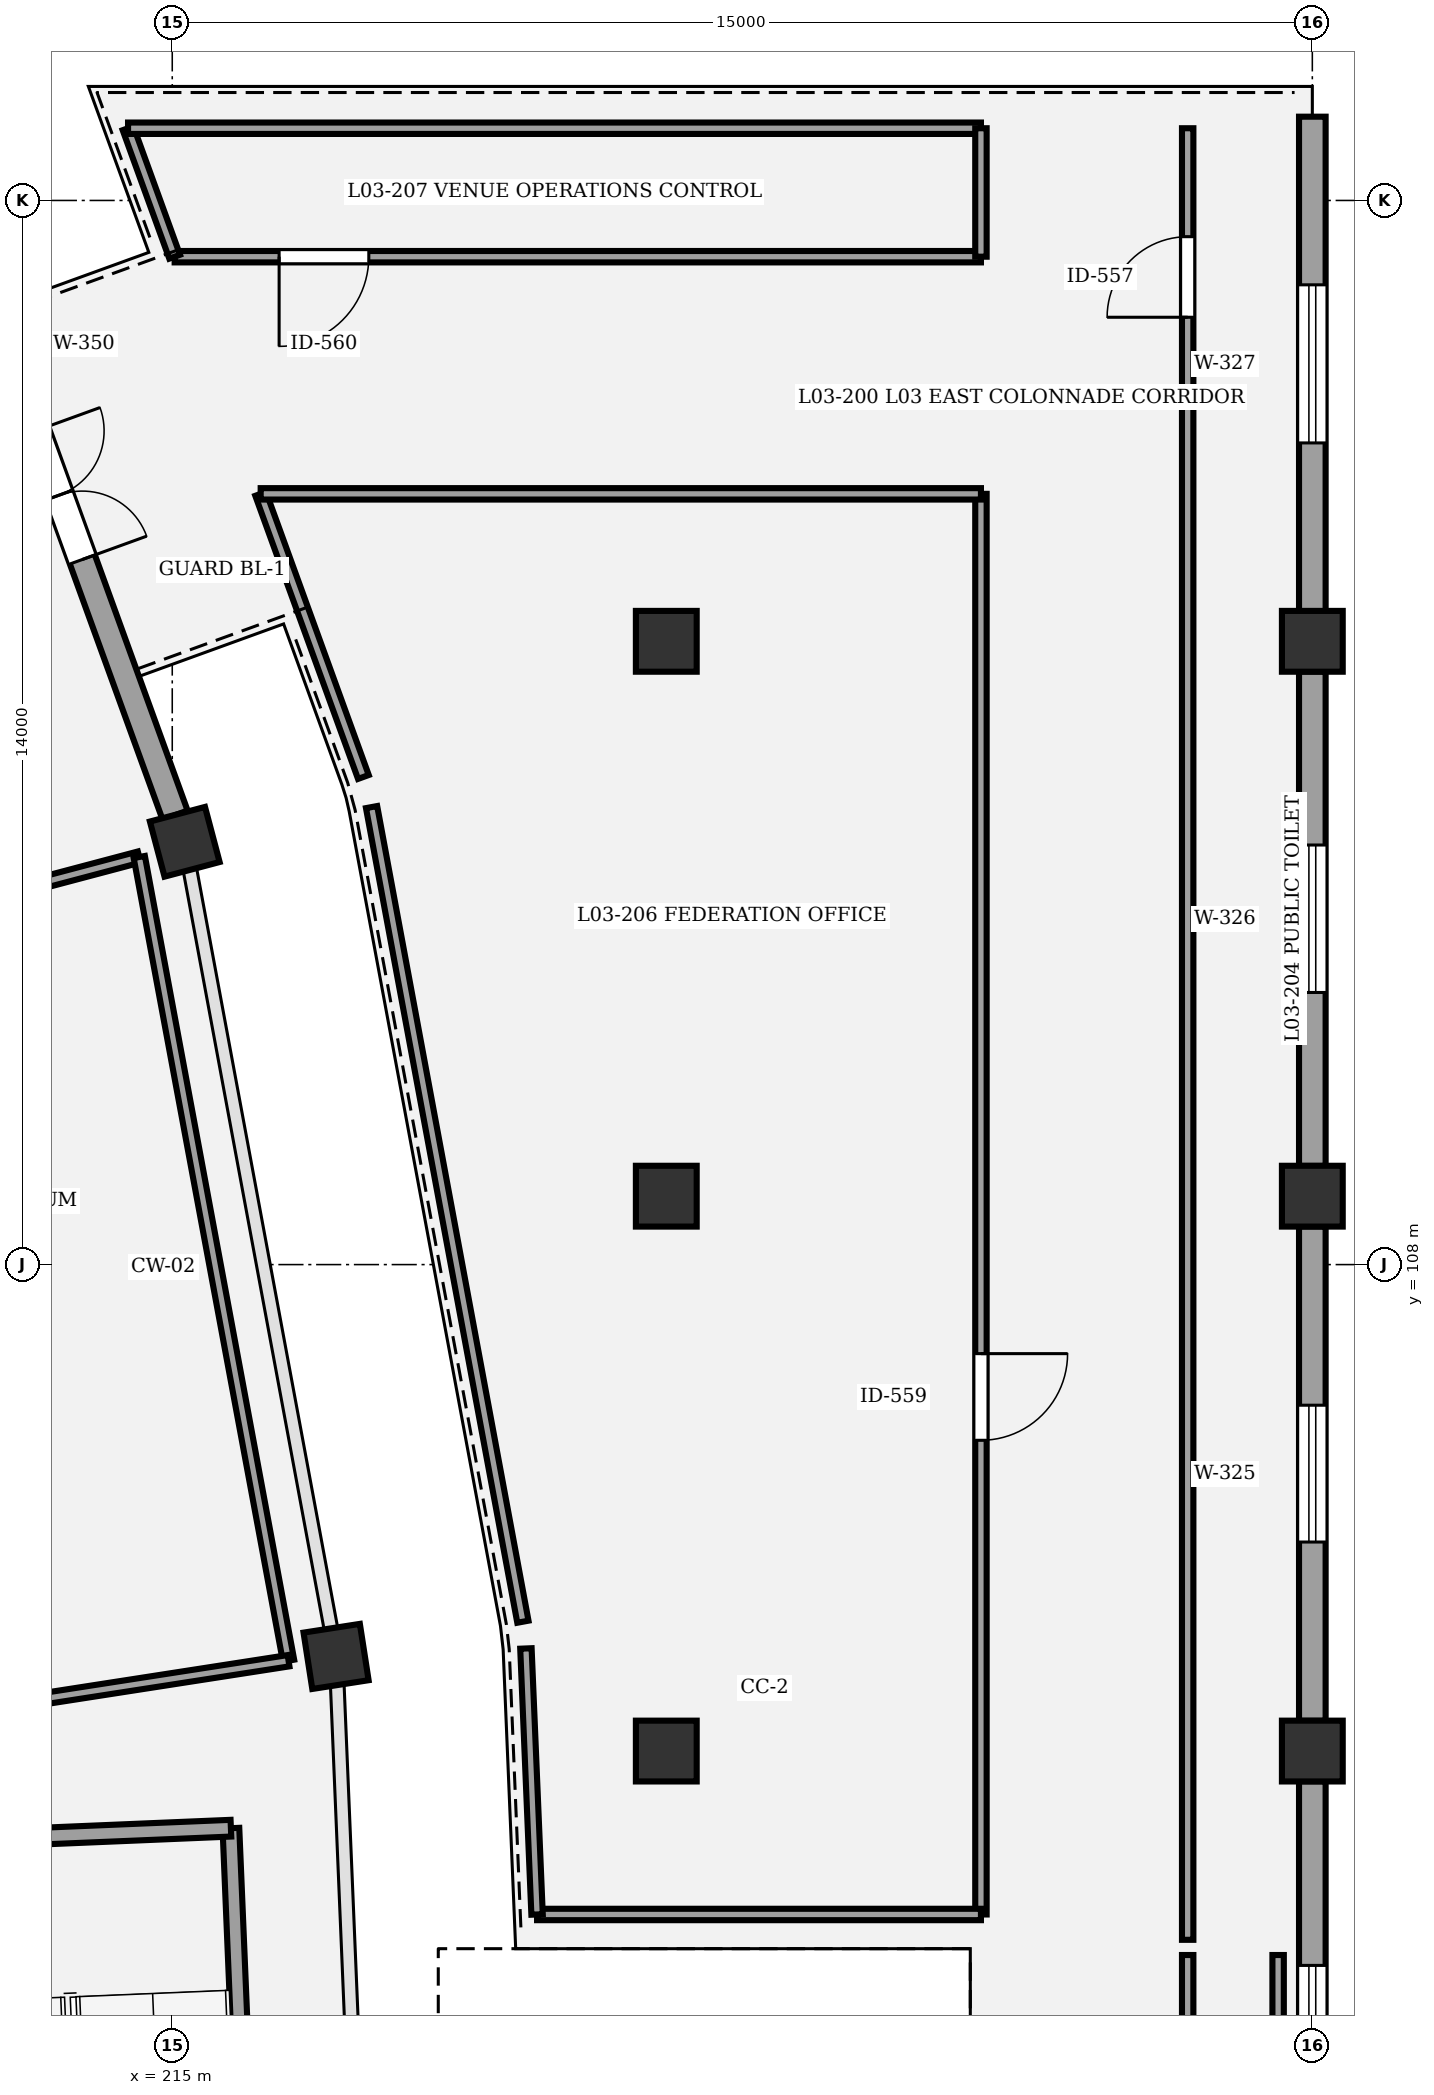
"""IFC4 building model, lengths in metres.
Left out: names, types, materials, properties, quantities, classifications, styles, units other than length and angle.
Written with IfcOpenShell. Run it as: python <this file> out.ifc"""

import sys

from ifc_helpers import new_model, si_unit, direction, frame, frame_2d, origin, origin_2d, place, context, subcontext, project, spatial, rectangle, circle, extrude, element, fill, save


model = new_model("IFC4")
c1 = context("Model", 3, precision=1e-05, world=origin(), true_north=direction((0.0, 1.0)))
c2 = subcontext(c1, "Body", "Model", "MODEL_VIEW")
j1 = project(units=[si_unit("LENGTHUNIT", "METRE"), si_unit("PLANEANGLEUNIT", "RADIAN")], contexts=[c1])
p1 = place(None, origin())
s1 = spatial("IfcSite", under=j1, at=p1, CompositionType="ELEMENT")
p2 = place(p1, origin())
s2 = spatial("IfcBuilding", under=s1, at=p2, CompositionType="ELEMENT")
p3 = place(p2, frame((0.0, 0.0, 14.7)))
s3 = spatial("IfcBuildingStorey", under=s2, at=p3, CompositionType="ELEMENT", Elevation=14.7)
for number, where, z_axis, x_axis in (
    (1, (217.156, 102.845, 0.0), (0.0, 0.0, 1.0), (0.988, 0.153, 0.0)),
    (2, (215.165, 113.562, 0.0), (0.0, 0.0, 1.0), (0.967, 0.256, 0.0)),
):
    element("IfcColumn", number, at=place(p3, frame(where, z_axis=z_axis, x_axis=x_axis)), inside=s3, PredefinedType="COLUMN", context=c2, shape_type="SweptSolid", body=[
        extrude(rectangle(XDim=0.75, YDim=0.75, at=origin_2d()), origin(), (0.0, 0.0, 1.0), 4.5),
    ])
for number, where, z_axis, x_axis in (
    (3, (221.5, 101.6, 0.0), (0.0, 0.0, 1.0), (1.0, 0.0, 0.0)),
    (4, (221.5, 108.9, 0.0), (0.0, 0.0, 1.0), (1.0, 0.0, 0.0)),
    (5, (221.5, 116.2, 0.0), (0.0, 0.0, 1.0), (1.0, 0.0, 0.0)),
    (6, (230.0, 101.6, 0.0), (0.0, 0.0, 1.0), (1.0, 0.0, 0.0)),
    (7, (230.0, 108.9, 0.0), (0.0, 0.0, 1.0), (1.0, 0.0, 0.0)),
    (8, (230.0, 116.2, 0.0), (0.0, 0.0, 1.0), (1.0, 0.0, 0.0)),
):
    element("IfcColumn", number, at=place(p3, frame(where, z_axis=z_axis, x_axis=x_axis)), inside=s3, PredefinedType="COLUMN", context=c2, shape_type="SweptSolid", body=[
        extrude(circle(Radius=0.4, at=origin_2d()), origin(), (0.0, 0.0, 1.0), 4.5),
    ])
p4 = place(p3, frame((211.983, 122.332, 0.0), z_axis=(0.0, 0.0, 1.0), x_axis=(0.341014063491, -0.94005819421, 0.0)))
e9 = element("IfcWall", 9, at=p4, inside=s3, PredefinedType="STANDARD", context=c2, shape_type="SweptSolid", body=[
    extrude(rectangle(XDim=8.956, YDim=0.35, at=frame_2d((4.478, 0.0))), origin(), (0.0, 0.0, 1.0), 3.42),
])
p5 = place(p4, frame((3.578, 0.0, 0.0)))
e10 = element("IfcOpeningElement", 10, at=p5, cuts=e9, PredefinedType="OPENING", context=c2, shape_type="SweptSolid", body=[
    extrude(rectangle(XDim=1.8, YDim=2.4, at=frame_2d((0.9, 1.2))), frame((0.0, 0.185, 0.0), z_axis=(0.0, -1.0, 0.0), x_axis=(1.0, 0.0, 0.0)), (0.0, 0.0, 1.0), 0.37),
])
p6 = place(p3, frame((230.0, 101.202, 0.0), z_axis=(0.0, 0.0, 1.0), x_axis=(0.0, -1.0, 0.0)))
e11 = element("IfcWall", 11, at=p6, inside=s3, PredefinedType="STANDARD", context=c2, shape_type="SweptSolid", body=[
    extrude(rectangle(XDim=6.504, YDim=0.35, at=frame_2d((3.252, 0.0))), origin(), (0.0, 0.0, 1.0), 3.26),
])
p7 = place(p6, frame((2.422, 0.0, 0.9)))
e12 = element("IfcOpeningElement", 12, at=p7, cuts=e11, PredefinedType="OPENING", context=c2, shape_type="SweptSolid", body=[
    extrude(rectangle(XDim=1.66, YDim=1.75, at=frame_2d((0.83, 0.875))), frame((0.0, 0.185, 0.0), z_axis=(0.0, -1.0, 0.0), x_axis=(1.0, 0.0, 0.0)), (0.0, 0.0, 1.0), 0.37),
])
p8 = place(p3, frame((230.0, 108.502, 0.0), z_axis=(0.0, 0.0, 1.0), x_axis=(0.0, -1.0, 0.0)))
e13 = element("IfcWall", 13, at=p8, inside=s3, PredefinedType="STANDARD", context=c2, shape_type="SweptSolid", body=[
    extrude(rectangle(XDim=6.504, YDim=0.35, at=frame_2d((3.252, 0.0))), origin(), (0.0, 0.0, 1.0), 3.26),
])
p9 = place(p8, frame((2.352, 0.0, 0.9)))
e14 = element("IfcOpeningElement", 14, at=p9, cuts=e13, PredefinedType="OPENING", context=c2, shape_type="SweptSolid", body=[
    extrude(rectangle(XDim=1.8, YDim=1.75, at=frame_2d((0.9, 0.875))), frame((0.0, 0.185, 0.0), z_axis=(0.0, -1.0, 0.0), x_axis=(1.0, 0.0, 0.0)), (0.0, 0.0, 1.0), 0.37),
])
p10 = place(p3, frame((230.0, 115.802, 0.0), z_axis=(0.0, 0.0, 1.0), x_axis=(0.0, -1.0, 0.0)))
e15 = element("IfcWall", 15, at=p10, inside=s3, PredefinedType="STANDARD", context=c2, shape_type="SweptSolid", body=[
    extrude(rectangle(XDim=6.504, YDim=0.35, at=frame_2d((3.252, 0.0))), origin(), (0.0, 0.0, 1.0), 3.26),
])
p11 = place(p10, frame((2.282, 0.0, 0.9)))
e16 = element("IfcOpeningElement", 16, at=p11, cuts=e15, PredefinedType="OPENING", context=c2, shape_type="SweptSolid", body=[
    extrude(rectangle(XDim=1.94, YDim=1.75, at=frame_2d((0.97, 0.875))), frame((0.0, 0.185, 0.0), z_axis=(0.0, -1.0, 0.0), x_axis=(1.0, 0.0, 0.0)), (0.0, 0.0, 1.0), 0.37),
])
p12 = place(p3, frame((230.0, 123.102, 0.0), z_axis=(0.0, 0.0, 1.0), x_axis=(0.0, -1.0, 0.0)))
e17 = element("IfcWall", 17, at=p12, inside=s3, PredefinedType="STANDARD", context=c2, shape_type="SweptSolid", body=[
    extrude(rectangle(XDim=6.504, YDim=0.35, at=frame_2d((3.252, 0.0))), origin(), (0.0, 0.0, 1.0), 3.26),
])
p13 = place(p12, frame((2.212, 0.0, 0.9)))
e18 = element("IfcOpeningElement", 18, at=p13, cuts=e17, PredefinedType="OPENING", context=c2, shape_type="SweptSolid", body=[
    extrude(rectangle(XDim=2.08, YDim=1.75, at=frame_2d((1.04, 0.875))), frame((0.0, 0.185, 0.0), z_axis=(0.0, -1.0, 0.0), x_axis=(1.0, 0.0, 0.0)), (0.0, 0.0, 1.0), 0.37),
])
p14 = place(p3, frame((215.772, 100.585, 0.0), z_axis=(0.0, 0.0, 1.0), x_axis=(0.041871977473, -0.999122984173, 0.0)))
e19 = element("IfcWall", 19, at=p14, inside=s3, PredefinedType="SHEAR", context=c2, shape_type="SweptSolid", body=[
    extrude(rectangle(XDim=11.02, YDim=0.22, at=frame_2d((5.51, 0.0))), origin(), (0.0, 0.0, 1.0), 4.25),
])
p15 = place(p3, frame((211.365, 100.4, 0.0), z_axis=(0.0, 0.0, 1.0), x_axis=(0.999121521721, 0.041906859039, 0.0)))
e20 = element("IfcWall", 20, at=p15, inside=s3, PredefinedType="SHEAR", context=c2, shape_type="SweptSolid", body=[
    extrude(rectangle(XDim=4.41, YDim=0.22, at=frame_2d((2.205, 0.0))), origin(), (0.0, 0.0, 1.0), 4.25),
])
p16 = place(p3, frame((228.36, 75.083, 0.0), z_axis=(0.0, 0.0, 1.0), x_axis=(0.0, 1.0, 0.0)))
e21 = element("IfcWall", 21, at=p16, inside=s3, PredefinedType="PARTITIONING", context=c2, shape_type="SweptSolid", body=[
    extrude(rectangle(XDim=23.833, YDim=0.15, at=frame_2d((11.917, 0.0))), origin(), (0.0, 0.0, 1.0), 3.25),
])
p17 = place(p16, frame((8.081, 0.0, 0.0)))
e22 = element("IfcOpeningElement", 22, at=p17, cuts=e21, PredefinedType="OPENING", context=c2, shape_type="SweptSolid", body=[
    extrude(rectangle(XDim=1.02, YDim=2.2, at=frame_2d((0.51, 1.1))), frame((0.0, 0.085, 0.0), z_axis=(0.0, -1.0, 0.0), x_axis=(1.0, 0.0, 0.0)), (0.0, 0.0, 1.0), 0.17),
])
p18 = place(p3, frame((228.36, 99.117, 0.0), z_axis=(0.0, 0.0, 1.0), x_axis=(0.0, 1.0, 0.0)))
e23 = element("IfcWall", 23, at=p18, inside=s3, PredefinedType="PARTITIONING", context=c2, shape_type="SweptSolid", body=[
    extrude(rectangle(XDim=23.833, YDim=0.15, at=frame_2d((11.917, 0.0))), origin(), (0.0, 0.0, 1.0), 3.25),
])
p19 = place(p18, frame((21.347, 0.0, 0.0)))
e24 = element("IfcOpeningElement", 24, at=p19, cuts=e23, PredefinedType="OPENING", context=c2, shape_type="SweptSolid", body=[
    extrude(rectangle(XDim=1.06, YDim=2.2, at=frame_2d((0.53, 1.1))), frame((0.0, 0.085, 0.0), z_axis=(0.0, -1.0, 0.0), x_axis=(1.0, 0.0, 0.0)), (0.0, 0.0, 1.0), 0.17),
])
p20 = place(p3, frame((225.64, 118.14, 0.0), z_axis=(0.0, 0.0, 1.0), x_axis=(0.0, -1.0, 0.0)))
e25 = element("IfcWall", 25, at=p20, inside=s3, PredefinedType="PARTITIONING", context=c2, shape_type="SweptSolid", body=[
    extrude(rectangle(XDim=18.69, YDim=0.15, at=frame_2d((9.345, 0.0))), origin(), (0.0, 0.0, 1.0), 3.25),
])
p21 = place(p20, frame((11.312, 0.0, 0.0)))
e26 = element("IfcOpeningElement", 26, at=p21, cuts=e25, PredefinedType="OPENING", context=c2, shape_type="SweptSolid", body=[
    extrude(rectangle(XDim=1.14, YDim=2.2, at=frame_2d((0.57, 1.1))), frame((0.0, 0.085, 0.0), z_axis=(0.0, -1.0, 0.0), x_axis=(1.0, 0.0, 0.0)), (0.0, 0.0, 1.0), 0.17),
])
p22 = place(p3, frame((225.64, 121.26, 0.0), z_axis=(0.0, 0.0, 1.0), x_axis=(-1.0, 0.0, 0.0)))
e27 = element("IfcWall", 27, at=p22, inside=s3, PredefinedType="PARTITIONING", context=c2, shape_type="SweptSolid", body=[
    extrude(rectangle(XDim=10.608, YDim=0.15, at=frame_2d((5.304, 0.0))), origin(), (0.0, 0.0, 1.0), 3.25),
])
p23 = place(p22, frame((8.054, 0.0, 0.0)))
e28 = element("IfcOpeningElement", 28, at=p23, cuts=e27, PredefinedType="OPENING", context=c2, shape_type="SweptSolid", body=[
    extrude(rectangle(XDim=1.18, YDim=2.2, at=frame_2d((0.59, 1.1))), frame((0.0, 0.085, 0.0), z_axis=(0.0, -1.0, 0.0), x_axis=(1.0, 0.0, 0.0)), (0.0, 0.0, 1.0), 0.17),
])
p24 = place(p3, frame((206.895, 111.328, 0.0), z_axis=(0.0, 0.0, 1.0), x_axis=(0.966593450181, 0.25631445934, 0.0)))
e29 = element("IfcWall", 29, at=p24, inside=s3, PredefinedType="PARTITIONING", context=c2, shape_type="SweptSolid", body=[
    extrude(rectangle(XDim=7.936, YDim=0.15, at=frame_2d((3.968, 0.0))), origin(), (0.0, 0.0, 1.0), 3.25),
])
p25 = place(p3, frame((214.566, 113.362, 0.0), z_axis=(0.0, 0.0, 1.0), x_axis=(0.182607868301, -0.983185824976, 0.0)))
e30 = element("IfcWall", 30, at=p25, inside=s3, PredefinedType="PARTITIONING", context=c2, shape_type="SweptSolid", body=[
    extrude(rectangle(XDim=10.755, YDim=0.15, at=frame_2d((5.377, 0.0))), origin(), (0.0, 0.0, 1.0), 3.25),
])
p26 = place(p3, frame((216.53, 102.789, 0.0), z_axis=(0.0, 0.0, 1.0), x_axis=(-0.988185582016, -0.153262048451, 0.0)))
e31 = element("IfcWall", 31, at=p26, inside=s3, PredefinedType="PARTITIONING", context=c2, shape_type="SweptSolid", body=[
    extrude(rectangle(XDim=7.917, YDim=0.15, at=frame_2d((3.958, 0.0))), origin(), (0.0, 0.0, 1.0), 3.25),
])
p27 = place(p3, frame((229.55, 98.917, 0.0), z_axis=(0.0, 0.0, 1.0), x_axis=(0.0, -1.0, 0.0)))
e32 = element("IfcWall", 32, at=p27, inside=s3, PredefinedType="PARTITIONING", context=c2, shape_type="SweptSolid", body=[
    extrude(rectangle(XDim=23.833, YDim=0.15, at=frame_2d((11.917, 0.0))), origin(), (0.0, 0.0, 1.0), 3.25),
])
p28 = place(p3, frame((219.613, 103.302, 0.0), z_axis=(0.0, 0.0, 1.0), x_axis=(-0.182620957058, 0.983183393901, 0.0)))
e33 = element("IfcWall", 33, at=p28, inside=s3, PredefinedType="PARTITIONING", context=c2, shape_type="SweptSolid", body=[
    extrude(rectangle(XDim=10.901, YDim=0.15, at=frame_2d((5.45, 0.0))), origin(), (0.0, 0.0, 1.0), 3.25),
])
p29 = place(p3, frame((217.515, 114.415, 0.0), z_axis=(0.0, 0.0, 1.0), x_axis=(-0.341035525383, 0.94005040845, 0.0)))
e34 = element("IfcWall", 34, at=p29, inside=s3, PredefinedType="PARTITIONING", context=c2, shape_type="SweptSolid", body=[
    extrude(rectangle(XDim=3.962, YDim=0.15, at=frame_2d((1.981, 0.0))), origin(), (0.0, 0.0, 1.0), 3.25),
])
p30 = place(p3, frame((216.163, 118.14, 0.0), z_axis=(0.0, 0.0, 1.0), x_axis=(1.0, 0.0, 0.0)))
e35 = element("IfcWall", 35, at=p30, inside=s3, PredefinedType="PARTITIONING", context=c2, shape_type="SweptSolid", body=[
    extrude(rectangle(XDim=9.477, YDim=0.15, at=frame_2d((4.738, 0.0))), origin(), (0.0, 0.0, 1.0), 3.25),
])
p31 = place(p3, frame((225.64, 99.45, 0.0), z_axis=(0.0, 0.0, 1.0), x_axis=(-1.0, 0.0, 0.0)))
e36 = element("IfcWall", 36, at=p31, inside=s3, PredefinedType="PARTITIONING", context=c2, shape_type="SweptSolid", body=[
    extrude(rectangle(XDim=5.84, YDim=0.15, at=frame_2d((2.92, 0.0))), origin(), (0.0, 0.0, 1.0), 3.25),
])
p32 = place(p3, frame((219.8, 99.45, 0.0), z_axis=(0.0, 0.0, 1.0), x_axis=(-0.041888559174, 0.999122289117, 0.0)))
e37 = element("IfcWall", 37, at=p32, inside=s3, PredefinedType="PARTITIONING", context=c2, shape_type="SweptSolid", body=[
    extrude(rectangle(XDim=3.503, YDim=0.15, at=frame_2d((1.751, 0.0))), origin(), (0.0, 0.0, 1.0), 3.25),
])
p33 = place(p3, frame((215.031, 121.26, 0.0), z_axis=(0.0, 0.0, 1.0), x_axis=(-0.341012375502, 0.940058806541, 0.0)))
e38 = element("IfcWall", 38, at=p33, inside=s3, PredefinedType="PARTITIONING", context=c2, shape_type="SweptSolid", body=[
    extrude(rectangle(XDim=1.798, YDim=0.15, at=frame_2d((0.899, 0.0))), origin(), (0.0, 0.0, 1.0), 3.25),
])
p34 = place(p3, frame((214.418, 122.95, 0.0), z_axis=(0.0, 0.0, 1.0), x_axis=(1.0, 0.0, 0.0)))
e39 = element("IfcWall", 39, at=p34, inside=s3, PredefinedType="PARTITIONING", context=c2, shape_type="SweptSolid", body=[
    extrude(rectangle(XDim=11.221, YDim=0.15, at=frame_2d((5.611, 0.0))), origin(), (0.0, 0.0, 1.0), 3.25),
])
p35 = place(p3, frame((225.64, 122.95, 0.0), z_axis=(0.0, 0.0, 1.0), x_axis=(0.0, -1.0, 0.0)))
e40 = element("IfcWall", 40, at=p35, inside=s3, PredefinedType="PARTITIONING", context=c2, shape_type="SweptSolid", body=[
    extrude(rectangle(XDim=1.69, YDim=0.15, at=frame_2d((0.845, 0.0))), origin(), (0.0, 0.0, 1.0), 3.25),
])
p36 = place(p5, origin())
e41 = element("IfcDoor", 41, at=p36, inside=s3, OperationType="DOUBLE_DOOR_SINGLE_SWING", PredefinedType="DOOR", context=c2, shape_type="SweptSolid", body=[
    extrude(rectangle(XDim=1.8, YDim=2.4, at=frame_2d((0.9, 1.2))), frame((0.0, 0.025, 0.0), z_axis=(0.0, -1.0, 0.0), x_axis=(1.0, 0.0, 0.0)), (0.0, 0.0, 1.0), 0.05),
])
fill(e10, e41)
p37 = place(p7, origin())
e42 = element("IfcWindow", 42, at=p37, inside=s3, PartitioningType="SINGLE_PANEL", PredefinedType="WINDOW", context=c2, shape_type="SweptSolid", body=[
    extrude(rectangle(XDim=1.66, YDim=1.75, at=frame_2d((0.83, 0.875))), frame((0.0, 0.03, 0.0), z_axis=(0.0, -1.0, 0.0), x_axis=(1.0, 0.0, 0.0)), (0.0, 0.0, 1.0), 0.06),
])
fill(e12, e42)
p38 = place(p9, origin())
e43 = element("IfcWindow", 43, at=p38, inside=s3, PartitioningType="SINGLE_PANEL", PredefinedType="WINDOW", context=c2, shape_type="SweptSolid", body=[
    extrude(rectangle(XDim=1.8, YDim=1.75, at=frame_2d((0.9, 0.875))), frame((0.0, 0.03, 0.0), z_axis=(0.0, -1.0, 0.0), x_axis=(1.0, 0.0, 0.0)), (0.0, 0.0, 1.0), 0.06),
])
fill(e14, e43)
p39 = place(p11, origin())
e44 = element("IfcWindow", 44, at=p39, inside=s3, PartitioningType="SINGLE_PANEL", PredefinedType="WINDOW", context=c2, shape_type="SweptSolid", body=[
    extrude(rectangle(XDim=1.94, YDim=1.75, at=frame_2d((0.97, 0.875))), frame((0.0, 0.03, 0.0), z_axis=(0.0, -1.0, 0.0), x_axis=(1.0, 0.0, 0.0)), (0.0, 0.0, 1.0), 0.06),
])
fill(e16, e44)
p40 = place(p13, origin())
e45 = element("IfcWindow", 45, at=p40, inside=s3, PartitioningType="SINGLE_PANEL", PredefinedType="WINDOW", context=c2, shape_type="SweptSolid", body=[
    extrude(rectangle(XDim=2.08, YDim=1.75, at=frame_2d((1.04, 0.875))), frame((0.0, 0.03, 0.0), z_axis=(0.0, -1.0, 0.0), x_axis=(1.0, 0.0, 0.0)), (0.0, 0.0, 1.0), 0.06),
])
fill(e18, e45)
p41 = place(p19, origin())
e46 = element("IfcDoor", 46, at=p41, inside=s3, OperationType="SINGLE_SWING_LEFT", PredefinedType="DOOR", context=c2, shape_type="SweptSolid", body=[
    extrude(rectangle(XDim=1.06, YDim=2.2, at=frame_2d((0.53, 1.1))), frame((0.0, 0.025, 0.0), z_axis=(0.0, -1.0, 0.0), x_axis=(1.0, 0.0, 0.0)), (0.0, 0.0, 1.0), 0.05),
])
fill(e24, e46)
p42 = place(p21, origin())
e47 = element("IfcDoor", 47, at=p42, inside=s3, OperationType="SINGLE_SWING_LEFT", PredefinedType="DOOR", context=c2, shape_type="SweptSolid", body=[
    extrude(rectangle(XDim=1.14, YDim=2.2, at=frame_2d((0.57, 1.1))), frame((0.0, 0.025, 0.0), z_axis=(0.0, -1.0, 0.0), x_axis=(1.0, 0.0, 0.0)), (0.0, 0.0, 1.0), 0.05),
])
fill(e26, e47)
p43 = place(p23, origin())
e48 = element("IfcDoor", 48, at=p43, inside=s3, OperationType="SINGLE_SWING_RIGHT", PredefinedType="DOOR", context=c2, shape_type="SweptSolid", body=[
    extrude(rectangle(XDim=1.18, YDim=2.2, at=frame_2d((0.59, 1.1))), frame((0.0, 0.025, 0.0), z_axis=(0.0, -1.0, 0.0), x_axis=(1.0, 0.0, 0.0)), (0.0, 0.0, 1.0), 0.05),
])
fill(e28, e48)
save(model, sys.argv[1])
